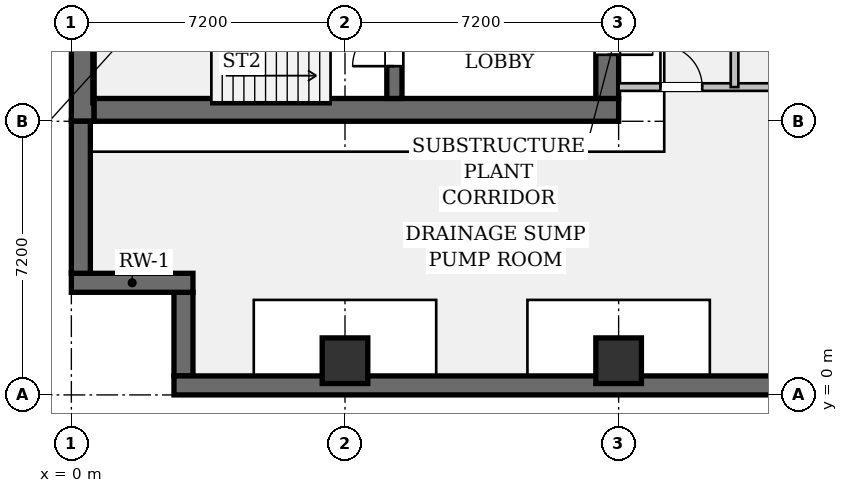
"""IFC4 building model, lengths in metres.
Left out: names, types, materials, properties, quantities, classifications, styles, units other than length and angle.
Written with IfcOpenShell. Run it as: python <this file> out.ifc"""

import sys

from ifc_helpers import new_model, si_unit, direction, frame, frame_2d, origin, origin_2d, place, context, subcontext, project, spatial, rectangle, hollow_rectangle, extrude, element, fill, save


model = new_model("IFC4")
c1 = context("Model", 3, precision=1e-05, world=origin(), true_north=direction((0.0, 1.0)))
c2 = subcontext(c1, "Body", "Model", "MODEL_VIEW")
j1 = project(units=[si_unit("LENGTHUNIT", "METRE"), si_unit("PLANEANGLEUNIT", "RADIAN")], contexts=[c1])
p1 = place(None, origin())
s1 = spatial("IfcSite", under=j1, at=p1, CompositionType="ELEMENT")
p2 = place(p1, origin())
s2 = spatial("IfcBuilding", under=s1, at=p2, CompositionType="ELEMENT")
p3 = place(p2, frame((0.0, 0.0, -9.1)))
s3 = spatial("IfcBuildingStorey", under=s2, at=p3, CompositionType="ELEMENT", Elevation=-9.1)
p4 = place(p3, frame((0.3, 7.2, 0.0), z_axis=(0.0, 0.0, 1.0), x_axis=(0.0, 1.0, 0.0)))
e1 = element("IfcWall", 1, at=p4, inside=s3, PredefinedType="SHEAR", context=c2, shape_type="SweptSolid", body=[
    extrude(rectangle(XDim=28.8, YDim=0.6, at=frame_2d((14.4, 0.0))), origin(), (0.0, 0.0, 1.0), 4.25),
])
p5 = place(p3, frame((0.6, 7.5, 0.0), z_axis=(0.0, 0.0, 1.0), x_axis=(1.0, 0.0, 0.0)))
e2 = element("IfcWall", 2, at=p5, inside=s3, PredefinedType="SHEAR", context=c2, shape_type="SweptSolid", body=[
    extrude(rectangle(XDim=13.8, YDim=0.6, at=frame_2d((6.9, 0.0))), origin(), (0.0, 0.0, 1.0), 4.25),
])
p6 = place(p3, frame((14.1, 35.4, 0.0), z_axis=(0.0, 0.0, 1.0), x_axis=(0.0, -1.0, 0.0)))
e3 = element("IfcWall", 3, at=p6, inside=s3, PredefinedType="SHEAR", context=c2, shape_type="SweptSolid", body=[
    extrude(rectangle(XDim=27.6, YDim=0.6, at=frame_2d((13.8, 0.0))), origin(), (0.0, 0.0, 1.0), 4.25),
])
p7 = place(p6, frame((1.3, 0.0, 0.0)))
e4 = element("IfcOpeningElement", 4, at=p7, cuts=e3, PredefinedType="OPENING", context=c2, shape_type="SweptSolid", body=[
    extrude(rectangle(XDim=1.2, YDim=2.15, at=frame_2d((0.6, 1.075))), frame((0.0, 0.312, 0.0), z_axis=(0.0, -1.0, 0.0), x_axis=(1.0, 0.0, 0.0)), (0.0, 0.0, 1.0), 0.624),
])
p8 = place(p6, frame((25.25, 0.0, 0.0)))
e5 = element("IfcOpeningElement", 5, at=p8, cuts=e3, PredefinedType="OPENING", context=c2, shape_type="SweptSolid", body=[
    extrude(rectangle(XDim=1.2, YDim=2.15, at=frame_2d((0.6, 1.075))), frame((0.0, 0.312, 0.0), z_axis=(0.0, -1.0, 0.0), x_axis=(1.0, 0.0, 0.0)), (0.0, 0.0, 1.0), 0.624),
])
p9 = place(p6, frame((14.6, 0.0, 0.0)))
e6 = element("IfcOpeningElement", 6, at=p9, cuts=e3, PredefinedType="OPENING", context=c2, shape_type="SweptSolid", body=[
    extrude(rectangle(XDim=1.6, YDim=2.2, at=frame_2d((0.8, 1.1))), frame((0.0, 0.312, 0.0), z_axis=(0.0, -1.0, 0.0), x_axis=(1.0, 0.0, 0.0)), (0.0, 0.0, 1.0), 0.624),
])
p10 = place(p3, frame((8.5, 7.8, 0.0), z_axis=(0.0, 0.0, 1.0), x_axis=(0.0, 1.0, 0.0)))
e7 = element("IfcWall", 7, at=p10, inside=s3, PredefinedType="SHEAR", context=c2, shape_type="SweptSolid", body=[
    extrude(rectangle(XDim=3.68, YDim=0.4, at=frame_2d((1.84, 0.0))), origin(), (0.0, 0.0, 1.0), 4.25),
])
p11 = place(p10, frame((0.85, 0.0, 0.0)))
e8 = element("IfcOpeningElement", 8, at=p11, cuts=e7, PredefinedType="OPENING", context=c2, shape_type="SweptSolid", body=[
    extrude(rectangle(XDim=1.1, YDim=2.15, at=frame_2d((0.55, 1.075))), frame((0.0, 0.212, 0.0), z_axis=(0.0, -1.0, 0.0), x_axis=(1.0, 0.0, 0.0)), (0.0, 0.0, 1.0), 0.424),
])
p12 = place(p3, frame((2.95, 0.5, 0.0), z_axis=(0.0, 0.0, 1.0), x_axis=(0.0, 1.0, 0.0)))
e9 = element("IfcWall", 9, at=p12, inside=s3, PredefinedType="SOLIDWALL", context=c2, shape_type="SweptSolid", body=[
    extrude(rectangle(XDim=2.2, YDim=0.5, at=frame_2d((1.1, 0.0))), origin(), (0.0, 0.0, 1.0), 4.25),
])
p13 = place(p3, frame((3.2, 2.95, 0.0), z_axis=(0.0, 0.0, 1.0), x_axis=(-1.0, 0.0, 0.0)))
e10 = element("IfcWall", 10, at=p13, inside=s3, PredefinedType="SOLIDWALL", context=c2, shape_type="SweptSolid", body=[
    extrude(rectangle(XDim=3.2, YDim=0.5, at=frame_2d((1.6, 0.0))), origin(), (0.0, 0.0, 1.0), 4.25),
])
p14 = place(p3, frame((0.25, 3.2, 0.0), z_axis=(0.0, 0.0, 1.0), x_axis=(0.0, 1.0, 0.0)))
e11 = element("IfcWall", 11, at=p14, inside=s3, PredefinedType="SOLIDWALL", context=c2, shape_type="SweptSolid", body=[
    extrude(rectangle(XDim=4.0, YDim=0.5, at=frame_2d((2.0, 0.0))), origin(), (0.0, 0.0, 1.0), 4.25),
])
p15 = place(p3, frame((83.7, 0.25, 0.0), z_axis=(0.0, 0.0, 1.0), x_axis=(-1.0, 0.0, 0.0)))
e12 = element("IfcWall", 12, at=p15, inside=s3, PredefinedType="SOLIDWALL", context=c2, shape_type="SweptSolid", body=[
    extrude(rectangle(XDim=81.0, YDim=0.5, at=frame_2d((40.5, 0.0))), origin(), (0.0, 0.0, 1.0), 4.25),
])
for number, where, z_axis, x_axis in (
    (13, (7.2, 0.9, 0.0), (0.0, 0.0, 1.0), (1.0, 0.0, 0.0)),
    (14, (14.4, 0.9, 0.0), (0.0, 0.0, 1.0), (1.0, 0.0, 0.0)),
):
    element("IfcColumn", number, at=place(p3, frame(where, z_axis=z_axis, x_axis=x_axis)), inside=s3, PredefinedType="COLUMN", context=c2, shape_type="SweptSolid", body=[
        extrude(hollow_rectangle(XDim=1.2, YDim=1.2, WallThickness=0.075, at=origin_2d()), origin(), (0.0, 0.0, 1.0), 4.25),
    ])
p16 = place(p3, frame((14.4, 8.1, 0.0), z_axis=(0.0, 0.0, 1.0), x_axis=(1.0, 0.0, 0.0)))
e15 = element("IfcWall", 15, at=p16, inside=s3, PredefinedType="PARTITIONING", context=c2, shape_type="SweptSolid", body=[
    extrude(rectangle(XDim=53.7, YDim=0.2, at=frame_2d((26.85, 0.0))), origin(), (0.0, 0.0, 1.0), 3.288),
])
p17 = place(p16, frame((1.1, 0.0, 0.0)))
e16 = element("IfcOpeningElement", 16, at=p17, cuts=e15, PredefinedType="OPENING", context=c2, shape_type="SweptSolid", body=[
    extrude(rectangle(XDim=1.1, YDim=2.15, at=frame_2d((0.55, 1.075))), frame((0.0, 0.112, 0.0), z_axis=(0.0, -1.0, 0.0), x_axis=(1.0, 0.0, 0.0)), (0.0, 0.0, 1.0), 0.224),
])
p18 = place(p3, frame((17.45, 8.1, 0.0), z_axis=(0.0, 0.0, 1.0), x_axis=(0.0, 1.0, 0.0)))
e17 = element("IfcWall", 17, at=p18, inside=s3, PredefinedType="PARTITIONING", context=c2, shape_type="SweptSolid", body=[
    extrude(rectangle(XDim=7.0, YDim=0.2, at=frame_2d((3.5, 0.0))), origin(), (0.0, 0.0, 1.0), 3.288),
])
p19 = place(p11, origin())
e18 = element("IfcDoor", 18, at=p19, inside=s3, OperationType="SINGLE_SWING_LEFT", PredefinedType="DOOR", context=c2, shape_type="SweptSolid", body=[
    extrude(rectangle(XDim=1.1, YDim=2.15, at=frame_2d((0.55, 1.075))), frame((0.0, 0.025, 0.0), z_axis=(0.0, -1.0, 0.0), x_axis=(1.0, 0.0, 0.0)), (0.0, 0.0, 1.0), 0.05),
])
fill(e8, e18)
p20 = place(p8, origin())
e19 = element("IfcDoor", 19, at=p20, inside=s3, OperationType="SINGLE_SWING_RIGHT", PredefinedType="DOOR", context=c2, shape_type="SweptSolid", body=[
    extrude(rectangle(XDim=1.2, YDim=2.15, at=frame_2d((0.6, 1.075))), frame((0.0, 0.025, 0.0), z_axis=(0.0, -1.0, 0.0), x_axis=(1.0, 0.0, 0.0)), (0.0, 0.0, 1.0), 0.05),
])
fill(e5, e19)
p21 = place(p17, origin())
e20 = element("IfcDoor", 20, at=p21, inside=s3, OperationType="SINGLE_SWING_LEFT", PredefinedType="DOOR", context=c2, shape_type="SweptSolid", body=[
    extrude(rectangle(XDim=1.1, YDim=2.15, at=frame_2d((0.55, 1.075))), frame((0.0, 0.025, 0.0), z_axis=(0.0, -1.0, 0.0), x_axis=(1.0, 0.0, 0.0)), (0.0, 0.0, 1.0), 0.05),
])
fill(e16, e20)
save(model, sys.argv[1])
